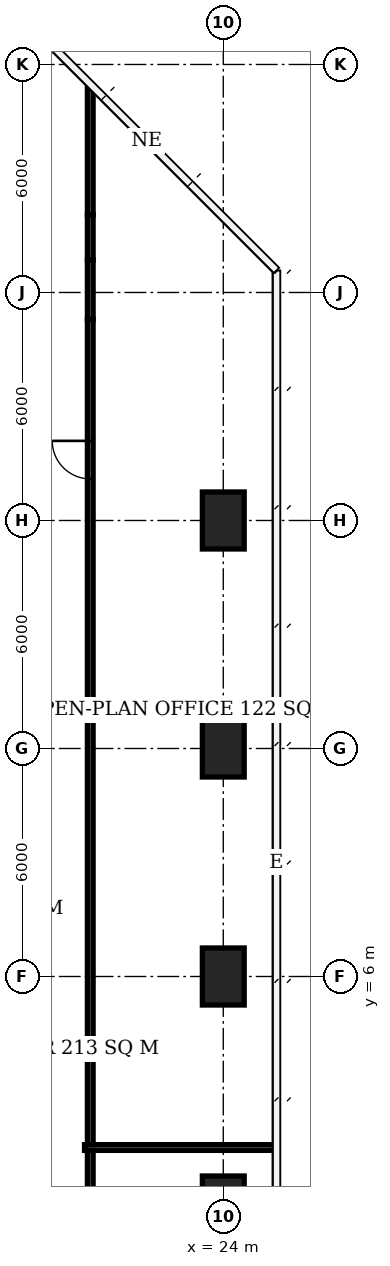
"""IFC4 building model, lengths in metres.
Left out: names, types, materials, properties, quantities, classifications, styles, units other than length and angle.
Written with IfcOpenShell. Run it as: python <this file> out.ifc"""

import sys

from ifc_helpers import new_model, si_unit, direction, frame, frame_2d, origin, origin_2d, place, context, subcontext, project, spatial, rectangle, extrude, element, fill, save


model = new_model("IFC4")
c1 = context("Model", 3, precision=1e-05, world=origin(), true_north=direction((0.0, 1.0)))
c2 = subcontext(c1, "Body", "Model", "MODEL_VIEW")
j1 = project(units=[si_unit("LENGTHUNIT", "METRE"), si_unit("PLANEANGLEUNIT", "RADIAN")], contexts=[c1])
p1 = place(None, origin())
s1 = spatial("IfcSite", under=j1, at=p1, CompositionType="ELEMENT")
p2 = place(p1, origin())
s2 = spatial("IfcBuilding", under=s1, at=p2, CompositionType="ELEMENT")
p3 = place(p2, frame((0.0, 0.0, 208.4)))
s3 = spatial("IfcBuildingStorey", under=s2, at=p3, CompositionType="ELEMENT", Elevation=208.4)
for number, where, z_axis, x_axis in (
    (1, (24.0, 0.0, 0.0), (0.0, 0.0, 1.0), (0.0, 1.0, 0.0)),
    (2, (24.0, 6.0, 0.0), (0.0, 0.0, 1.0), (0.0, 1.0, 0.0)),
    (3, (24.0, 12.0, 0.0), (0.0, 0.0, 1.0), (0.0, 1.0, 0.0)),
    (4, (24.0, 18.0, 0.0), (0.0, 0.0, 1.0), (0.0, 1.0, 0.0)),
):
    element("IfcColumn", number, at=place(p3, frame(where, z_axis=z_axis, x_axis=x_axis)), inside=s3, PredefinedType="COLUMN", context=c2, shape_type="SweptSolid", body=[
        extrude(rectangle(XDim=1.5, YDim=1.1, at=origin_2d()), origin(), (0.0, 0.0, 1.0), 3.9),
    ])
p4 = place(p3, frame((20.5, -11.39, 0.0), z_axis=(0.0, 0.0, 1.0), x_axis=(0.0, 1.0, 0.0)))
e5 = element("IfcWall", 5, at=p4, inside=s3, PredefinedType="PARTITIONING", context=c2, shape_type="SweptSolid", body=[
    extrude(rectangle(XDim=12.815, YDim=0.15, at=frame_2d((6.407, 0.0))), origin(), (0.0, 0.0, 1.0), 3.65),
])
p5 = place(p4, frame((7.897, 0.0, 0.0)))
e6 = element("IfcOpeningElement", 6, at=p5, cuts=e5, PredefinedType="OPENING", context=c2, shape_type="SweptSolid", body=[
    extrude(rectangle(XDim=1.0, YDim=2.1, at=frame_2d((0.5, 1.05))), frame((0.0, 0.085, 0.0), z_axis=(0.0, -1.0, 0.0), x_axis=(1.0, 0.0, 0.0)), (0.0, 0.0, 1.0), 0.17),
])
p6 = place(p3, frame((20.5, 1.575, 0.0), z_axis=(0.0, 0.0, 1.0), x_axis=(0.0, 1.0, 0.0)))
e7 = element("IfcWall", 7, at=p6, inside=s3, PredefinedType="PARTITIONING", context=c2, shape_type="SweptSolid", body=[
    extrude(rectangle(XDim=21.715, YDim=0.15, at=frame_2d((10.857, 0.0))), origin(), (0.0, 0.0, 1.0), 3.65),
])
p7 = place(p6, frame((17.52, 0.0, 0.0)))
e8 = element("IfcOpeningElement", 8, at=p7, cuts=e7, PredefinedType="OPENING", context=c2, shape_type="SweptSolid", body=[
    extrude(rectangle(XDim=1.0, YDim=2.1, at=frame_2d((0.5, 1.05))), frame((0.0, 0.085, 0.0), z_axis=(0.0, -1.0, 0.0), x_axis=(1.0, 0.0, 0.0)), (0.0, 0.0, 1.0), 0.17),
])
p8 = place(p3, frame((20.5, 23.29, 0.0), z_axis=(0.0, 0.0, 1.0), x_axis=(0.0, 1.0, 0.0)))
e9 = element("IfcWall", 9, at=p8, inside=s3, PredefinedType="PARTITIONING", context=c2, shape_type="SweptSolid", body=[
    extrude(rectangle(XDim=1.57, YDim=0.15, at=frame_2d((0.785, 0.0))), origin(), (0.0, 0.0, 1.0), 2.65),
])
p9 = place(p3, frame((20.5, 24.86, 0.0), z_axis=(0.0, 0.0, 1.0), x_axis=(0.0, 1.0, 0.0)))
e10 = element("IfcWall", 10, at=p9, inside=s3, PredefinedType="PARTITIONING", context=c2, shape_type="SweptSolid", body=[
    extrude(rectangle(XDim=1.18, YDim=0.15, at=frame_2d((0.59, 0.0))), origin(), (0.0, 0.0, 1.0), 2.65),
])
p10 = place(p3, frame((20.5, 26.04, 0.0), z_axis=(0.0, 0.0, 1.0), x_axis=(0.0, 1.0, 0.0)))
e11 = element("IfcWall", 11, at=p10, inside=s3, PredefinedType="PARTITIONING", context=c2, shape_type="SweptSolid", body=[
    extrude(rectangle(XDim=3.348, YDim=0.15, at=frame_2d((1.674, 0.0))), origin(), (0.0, 0.0, 1.0), 3.65),
])
p11 = place(p3, frame((20.35, 1.5, 0.0), z_axis=(0.0, 0.0, 1.0), x_axis=(1.0, 0.0, 0.0)))
e12 = element("IfcWall", 12, at=p11, inside=s3, PredefinedType="PARTITIONING", context=c2, shape_type="SweptSolid", body=[
    extrude(rectangle(XDim=5.05, YDim=0.15, at=frame_2d((2.525, 0.0))), origin(), (0.0, 0.0, 1.0), 3.65),
])
p12 = place(p7, origin())
e13 = element("IfcDoor", 13, at=p12, inside=s3, OperationType="SINGLE_SWING_RIGHT", PredefinedType="DOOR", context=c2, shape_type="SweptSolid", body=[
    extrude(rectangle(XDim=1.0, YDim=2.1, at=frame_2d((0.5, 1.05))), frame((0.0, 0.025, 0.0), z_axis=(0.0, -1.0, 0.0), x_axis=(1.0, 0.0, 0.0)), (0.0, 0.0, 1.0), 0.05),
])
fill(e8, e13)
save(model, sys.argv[1])
